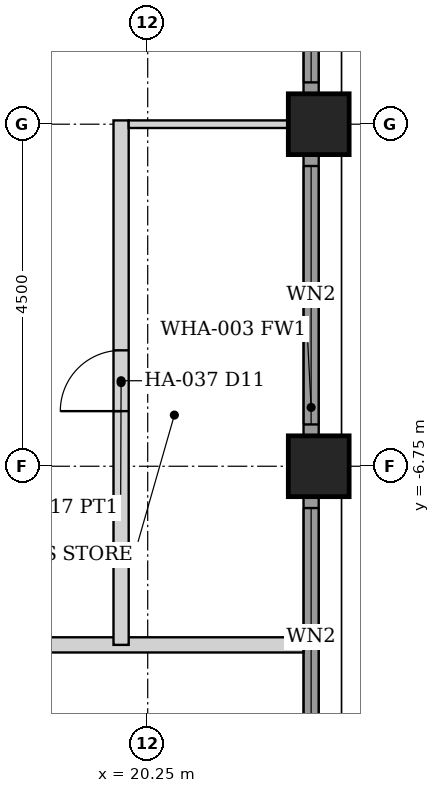
"""IFC4 building model, lengths in metres.
Left out: names, types, materials, properties, quantities, classifications, styles, units other than length and angle.
Written with IfcOpenShell. Run it as: python <this file> out.ifc"""

import sys

from ifc_helpers import new_model, si_unit, direction, frame, frame_2d, origin, origin_2d, place, context, subcontext, project, spatial, rectangle, hollow_rectangle, extrude, element, fill, save


model = new_model("IFC4")
c1 = context("Model", 3, precision=1e-05, world=origin(), true_north=direction((0.0, 1.0)))
c2 = subcontext(c1, "Body", "Model", "MODEL_VIEW")
j1 = project(units=[si_unit("LENGTHUNIT", "METRE"), si_unit("PLANEANGLEUNIT", "RADIAN")], contexts=[c1])
p1 = place(None, origin())
s1 = spatial("IfcSite", under=j1, at=p1, CompositionType="ELEMENT")
p2 = place(p1, origin())
s2 = spatial("IfcBuilding", under=s1, at=p2, CompositionType="ELEMENT")
p3 = place(p2, frame((0.0, 0.0, 118.4)))
s3 = spatial("IfcBuildingStorey", under=s2, at=p3, CompositionType="ELEMENT", Elevation=118.4)
for number, where, z_axis, x_axis in (
    (1, (22.5, -6.75, 0.0), (0.0, 0.0, 1.0), (1.0, 0.0, 0.0)),
    (2, (22.5, -2.25, 0.0), (0.0, 0.0, 1.0), (1.0, 0.0, 0.0)),
):
    element("IfcColumn", number, at=place(p3, frame(where, z_axis=z_axis, x_axis=x_axis)), inside=s3, PredefinedType="COLUMN", context=c2, shape_type="SweptSolid", body=[
        extrude(hollow_rectangle(XDim=0.8, YDim=0.8, WallThickness=0.06, at=origin_2d()), origin(), (0.0, 0.0, 1.0), 3.6),
    ])
p4 = place(p3, frame((22.4, -10.845, 0.0), z_axis=(0.0, 0.0, 1.0), x_axis=(0.0, 1.0, 0.0)))
e3 = element("IfcWall", 3, at=p4, inside=s3, PredefinedType="SOLIDWALL", context=c2, shape_type="SweptSolid", body=[
    extrude(rectangle(XDim=3.69, YDim=0.2, at=frame_2d((1.845, 0.0))), origin(), (0.0, 0.0, 1.0), 2.479),
])
p5 = place(p4, frame((0.145, 0.0, 0.3)))
e4 = element("IfcOpeningElement", 4, at=p5, cuts=e3, PredefinedType="OPENING", context=c2, shape_type="SweptSolid", body=[
    extrude(rectangle(XDim=3.4, YDim=2.029, at=frame_2d((1.7, 1.015))), frame((0.0, 0.11, 0.0), z_axis=(0.0, -1.0, 0.0), x_axis=(1.0, 0.0, 0.0)), (0.0, 0.0, 1.0), 0.22),
])
p6 = place(p3, frame((22.4, -6.345, 0.0), z_axis=(0.0, 0.0, 1.0), x_axis=(0.0, 1.0, 0.0)))
e5 = element("IfcWall", 5, at=p6, inside=s3, PredefinedType="SOLIDWALL", context=c2, shape_type="SweptSolid", body=[
    extrude(rectangle(XDim=3.69, YDim=0.2, at=frame_2d((1.845, 0.0))), origin(), (0.0, 0.0, 1.0), 2.479),
])
p7 = place(p6, frame((0.145, 0.0, 0.3)))
e6 = element("IfcOpeningElement", 6, at=p7, cuts=e5, PredefinedType="OPENING", context=c2, shape_type="SweptSolid", body=[
    extrude(rectangle(XDim=3.4, YDim=2.029, at=frame_2d((1.7, 1.015))), frame((0.0, 0.11, 0.0), z_axis=(0.0, -1.0, 0.0), x_axis=(1.0, 0.0, 0.0)), (0.0, 0.0, 1.0), 0.22),
])
p8 = place(p3, frame((22.4, -1.845, 0.0), z_axis=(0.0, 0.0, 1.0), x_axis=(0.0, 1.0, 0.0)))
e7 = element("IfcWall", 7, at=p8, inside=s3, PredefinedType="SOLIDWALL", context=c2, shape_type="SweptSolid", body=[
    extrude(rectangle(XDim=3.69, YDim=0.2, at=frame_2d((1.845, 0.0))), origin(), (0.0, 0.0, 1.0), 2.479),
])
p9 = place(p8, frame((0.145, 0.0, 0.3)))
e8 = element("IfcOpeningElement", 8, at=p9, cuts=e7, PredefinedType="OPENING", context=c2, shape_type="SweptSolid", body=[
    extrude(rectangle(XDim=3.4, YDim=2.029, at=frame_2d((1.7, 1.015))), frame((0.0, 0.11, 0.0), z_axis=(0.0, -1.0, 0.0), x_axis=(1.0, 0.0, 0.0)), (0.0, 0.0, 1.0), 0.22),
])
p10 = place(p3, frame((-22.3, -9.1, 0.0), z_axis=(0.0, 0.0, 1.0), x_axis=(1.0, 0.0, 0.0)))
e9 = element("IfcWall", 9, at=p10, inside=s3, PredefinedType="PARTITIONING", context=c2, shape_type="SweptSolid", body=[
    extrude(rectangle(XDim=44.6, YDim=0.2, at=frame_2d((22.3, 0.0))), origin(), (0.0, 0.0, 1.0), 2.473),
])
p11 = place(p10, frame((6.75, 0.0, 0.0)))
e10 = element("IfcOpeningElement", 10, at=p11, cuts=e9, PredefinedType="OPENING", context=c2, shape_type="SweptSolid", body=[
    extrude(rectangle(XDim=0.9, YDim=2.1, at=frame_2d((0.45, 1.05))), frame((0.0, 0.11, 0.0), z_axis=(0.0, -1.0, 0.0), x_axis=(1.0, 0.0, 0.0)), (0.0, 0.0, 1.0), 0.22),
])
p12 = place(p10, frame((11.25, 0.0, 0.0)))
e11 = element("IfcOpeningElement", 11, at=p12, cuts=e9, PredefinedType="OPENING", context=c2, shape_type="SweptSolid", body=[
    extrude(rectangle(XDim=0.9, YDim=2.1, at=frame_2d((0.45, 1.05))), frame((0.0, 0.11, 0.0), z_axis=(0.0, -1.0, 0.0), x_axis=(1.0, 0.0, 0.0)), (0.0, 0.0, 1.0), 0.22),
])
p13 = place(p10, frame((15.75, 0.0, 0.0)))
e12 = element("IfcOpeningElement", 12, at=p13, cuts=e9, PredefinedType="OPENING", context=c2, shape_type="SweptSolid", body=[
    extrude(rectangle(XDim=0.9, YDim=2.1, at=frame_2d((0.45, 1.05))), frame((0.0, 0.11, 0.0), z_axis=(0.0, -1.0, 0.0), x_axis=(1.0, 0.0, 0.0)), (0.0, 0.0, 1.0), 0.22),
])
p14 = place(p10, frame((20.25, 0.0, 0.0)))
e13 = element("IfcOpeningElement", 13, at=p14, cuts=e9, PredefinedType="OPENING", context=c2, shape_type="SweptSolid", body=[
    extrude(rectangle(XDim=0.9, YDim=2.1, at=frame_2d((0.45, 1.05))), frame((0.0, 0.11, 0.0), z_axis=(0.0, -1.0, 0.0), x_axis=(1.0, 0.0, 0.0)), (0.0, 0.0, 1.0), 0.22),
])
p15 = place(p10, frame((24.75, 0.0, 0.0)))
e14 = element("IfcOpeningElement", 14, at=p15, cuts=e9, PredefinedType="OPENING", context=c2, shape_type="SweptSolid", body=[
    extrude(rectangle(XDim=0.9, YDim=2.1, at=frame_2d((0.45, 1.05))), frame((0.0, 0.11, 0.0), z_axis=(0.0, -1.0, 0.0), x_axis=(1.0, 0.0, 0.0)), (0.0, 0.0, 1.0), 0.22),
])
p16 = place(p10, frame((29.25, 0.0, 0.0)))
e15 = element("IfcOpeningElement", 15, at=p16, cuts=e9, PredefinedType="OPENING", context=c2, shape_type="SweptSolid", body=[
    extrude(rectangle(XDim=0.9, YDim=2.1, at=frame_2d((0.45, 1.05))), frame((0.0, 0.11, 0.0), z_axis=(0.0, -1.0, 0.0), x_axis=(1.0, 0.0, 0.0)), (0.0, 0.0, 1.0), 0.22),
])
p17 = place(p10, frame((33.75, 0.0, 0.0)))
e16 = element("IfcOpeningElement", 16, at=p17, cuts=e9, PredefinedType="OPENING", context=c2, shape_type="SweptSolid", body=[
    extrude(rectangle(XDim=0.9, YDim=2.1, at=frame_2d((0.45, 1.05))), frame((0.0, 0.11, 0.0), z_axis=(0.0, -1.0, 0.0), x_axis=(1.0, 0.0, 0.0)), (0.0, 0.0, 1.0), 0.22),
])
p18 = place(p10, frame((38.85, 0.0, 0.0)))
e17 = element("IfcOpeningElement", 17, at=p18, cuts=e9, PredefinedType="OPENING", context=c2, shape_type="SweptSolid", body=[
    extrude(rectangle(XDim=0.9, YDim=2.1, at=frame_2d((0.45, 1.05))), frame((0.0, 0.11, 0.0), z_axis=(0.0, -1.0, 0.0), x_axis=(1.0, 0.0, 0.0)), (0.0, 0.0, 1.0), 0.22),
])
p19 = place(p10, frame((4.85, 0.0, 0.0)))
e18 = element("IfcOpeningElement", 18, at=p19, cuts=e9, PredefinedType="OPENING", context=c2, shape_type="SweptSolid", body=[
    extrude(rectangle(XDim=0.9, YDim=2.1, at=frame_2d((0.45, 1.05))), frame((0.0, 0.11, 0.0), z_axis=(0.0, -1.0, 0.0), x_axis=(1.0, 0.0, 0.0)), (0.0, 0.0, 1.0), 0.22),
])
p20 = place(p3, frame((19.9, -9.1, 0.0), z_axis=(0.0, 0.0, 1.0), x_axis=(0.0, 1.0, 0.0)))
e19 = element("IfcWall", 19, at=p20, inside=s3, PredefinedType="PARTITIONING", context=c2, shape_type="SweptSolid", body=[
    extrude(rectangle(XDim=6.9, YDim=0.2, at=frame_2d((3.45, 0.0))), origin(), (0.0, 0.0, 1.0), 2.473),
])
p21 = place(p20, frame((3.075, 0.0, 0.0)))
e20 = element("IfcOpeningElement", 20, at=p21, cuts=e19, PredefinedType="OPENING", context=c2, shape_type="SweptSolid", body=[
    extrude(rectangle(XDim=0.8, YDim=2.1, at=frame_2d((0.4, 1.05))), frame((0.0, 0.11, 0.0), z_axis=(0.0, -1.0, 0.0), x_axis=(1.0, 0.0, 0.0)), (0.0, 0.0, 1.0), 0.22),
])
p22 = place(p3, frame((20.0, -2.25, 0.0), z_axis=(0.0, 0.0, 1.0), x_axis=(1.0, 0.0, 0.0)))
e21 = element("IfcWall", 21, at=p22, inside=s3, PredefinedType="PARTITIONING", context=c2, shape_type="SweptSolid", body=[
    extrude(rectangle(XDim=2.1, YDim=0.1, at=frame_2d((1.05, 0.0))), origin(), (0.0, 0.0, 1.0), 2.473),
])
p23 = place(p5, origin())
e22 = element("IfcWindow", 22, at=p23, inside=s3, PartitioningType="SINGLE_PANEL", PredefinedType="WINDOW", context=c2, shape_type="SweptSolid", body=[
    extrude(rectangle(XDim=3.4, YDim=2.029, at=frame_2d((1.7, 1.015))), frame((0.0, 0.03, 0.0), z_axis=(0.0, -1.0, 0.0), x_axis=(1.0, 0.0, 0.0)), (0.0, 0.0, 1.0), 0.06),
])
fill(e4, e22)
p24 = place(p7, origin())
e23 = element("IfcWindow", 23, at=p24, inside=s3, PartitioningType="SINGLE_PANEL", PredefinedType="WINDOW", context=c2, shape_type="SweptSolid", body=[
    extrude(rectangle(XDim=3.4, YDim=2.029, at=frame_2d((1.7, 1.015))), frame((0.0, 0.03, 0.0), z_axis=(0.0, -1.0, 0.0), x_axis=(1.0, 0.0, 0.0)), (0.0, 0.0, 1.0), 0.06),
])
fill(e6, e23)
p25 = place(p9, origin())
e24 = element("IfcWindow", 24, at=p25, inside=s3, PartitioningType="SINGLE_PANEL", PredefinedType="WINDOW", context=c2, shape_type="SweptSolid", body=[
    extrude(rectangle(XDim=3.4, YDim=2.029, at=frame_2d((1.7, 1.015))), frame((0.0, 0.03, 0.0), z_axis=(0.0, -1.0, 0.0), x_axis=(1.0, 0.0, 0.0)), (0.0, 0.0, 1.0), 0.06),
])
fill(e8, e24)
p26 = place(p21, origin())
e25 = element("IfcDoor", 25, at=p26, inside=s3, OperationType="SINGLE_SWING_LEFT", PredefinedType="DOOR", context=c2, shape_type="SweptSolid", body=[
    extrude(rectangle(XDim=0.8, YDim=2.1, at=frame_2d((0.4, 1.05))), frame((0.0, 0.025, 0.0), z_axis=(0.0, -1.0, 0.0), x_axis=(1.0, 0.0, 0.0)), (0.0, 0.0, 1.0), 0.05),
])
fill(e20, e25)
save(model, sys.argv[1])
